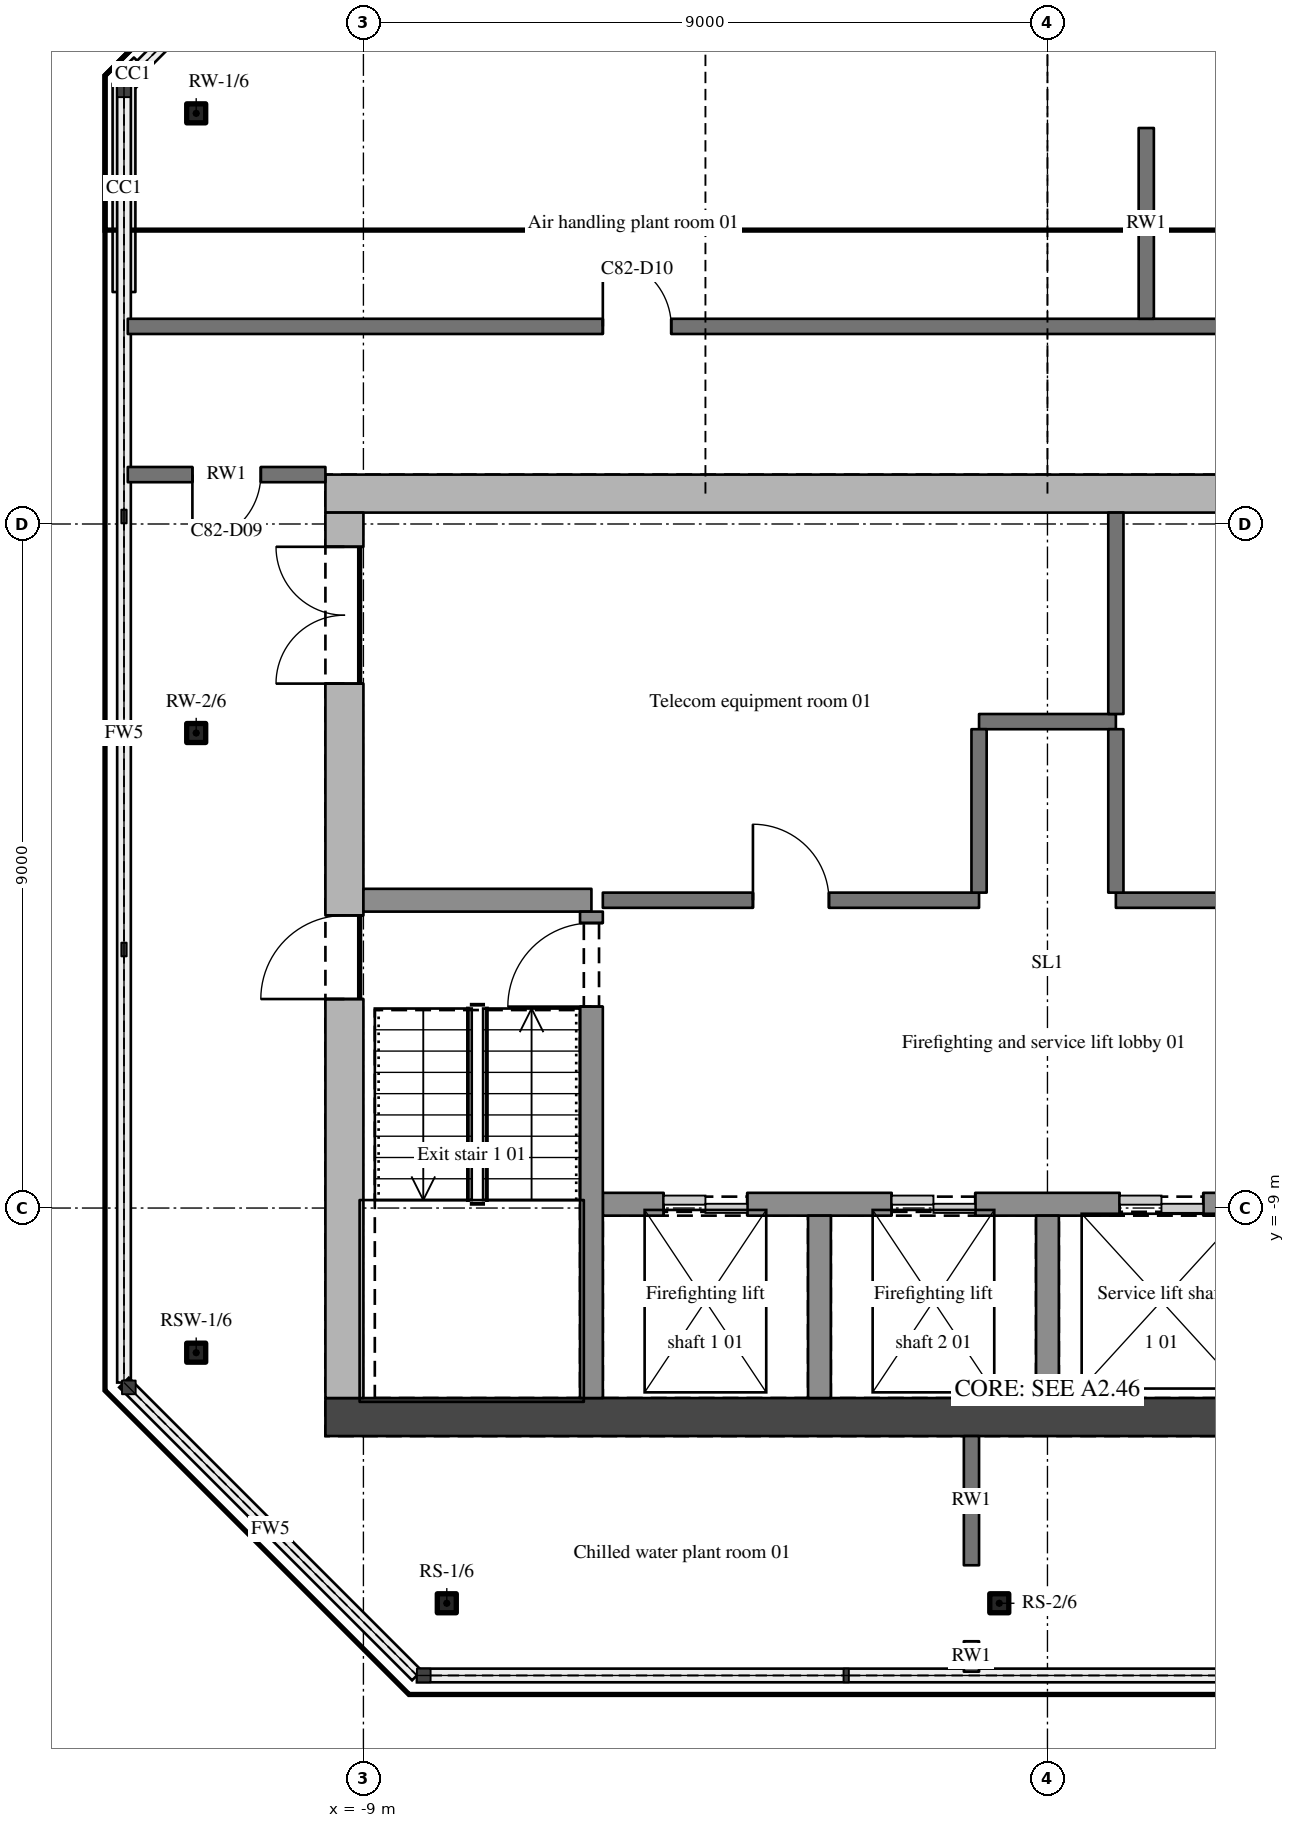
"""IFC4 building model, lengths in metres.
Left out: names, types, materials, properties, quantities, classifications, styles, units other than length and angle.
Written with IfcOpenShell. Run it as: python <this file> out.ifc"""

import sys

from ifc_helpers import new_model, si_unit, direction, frame, frame_2d, origin, origin_2d, place, context, subcontext, project, spatial, polyline, rectangle, hollow_rectangle, outline, extrude, element, fill, save


model = new_model("IFC4")
c1 = context("Model", 3, precision=1e-05, world=origin(), true_north=direction((0.0, 1.0)))
c2 = subcontext(c1, "Body", "Model", "MODEL_VIEW")
j1 = project(units=[si_unit("LENGTHUNIT", "METRE"), si_unit("PLANEANGLEUNIT", "RADIAN")], contexts=[c1])
p1 = place(None, origin())
s1 = spatial("IfcSite", under=j1, at=p1, CompositionType="ELEMENT")
p2 = place(p1, origin())
s2 = spatial("IfcBuilding", under=s1, at=p2, CompositionType="ELEMENT")
p3 = place(p2, frame((0.0, 0.0, 304.5)))
s3 = spatial("IfcBuildingStorey", under=s2, at=p3, CompositionType="ELEMENT", Elevation=304.5)
for number, where, z_axis, x_axis in (
    (1, (-7.903, -14.2, 0.0), (0.0, 0.0, 1.0), (1.0, 0.0, 0.0)),
    (2, (-0.634, -14.2, 0.0), (0.0, 0.0, 1.0), (1.0, 0.0, 0.0)),
):
    element("IfcColumn", number, at=place(p3, frame(where, z_axis=z_axis, x_axis=x_axis)), inside=s3, PredefinedType="COLUMN", context=c2, shape_type="SweptSolid", body=[
        extrude(hollow_rectangle(XDim=0.25, YDim=0.25, WallThickness=0.02, InnerFilletRadius=0.03, OuterFilletRadius=0.05, at=origin_2d()), origin(), (0.0, 0.0, 1.0), 3.6),
    ])
p4 = place(p3, frame((-11.2, 5.403, 0.0), z_axis=(0.0, 0.0, 1.0), x_axis=(1.0, 0.0, 0.0)))
e3 = element("IfcColumn", 3, at=p4, inside=s3, PredefinedType="COLUMN", context=c2, shape_type="SweptSolid", body=[
    extrude(hollow_rectangle(XDim=0.25, YDim=0.25, WallThickness=0.02, InnerFilletRadius=0.03, OuterFilletRadius=0.05, at=origin_2d()), origin(), (0.0, 0.0, 1.0), 3.392),
])
for number, where, z_axis, x_axis in (
    (4, (-11.2, -2.75, 0.0), (0.0, 0.0, 1.0), (1.0, 0.0, 0.0)),
    (5, (-11.2, -10.903, 0.0), (0.0, 0.0, 1.0), (1.0, 0.0, 0.0)),
):
    element("IfcColumn", number, at=place(p3, frame(where, z_axis=z_axis, x_axis=x_axis)), inside=s3, PredefinedType="COLUMN", context=c2, shape_type="SweptSolid", body=[
        extrude(hollow_rectangle(XDim=0.25, YDim=0.25, WallThickness=0.02, InnerFilletRadius=0.03, OuterFilletRadius=0.05, at=origin_2d()), origin(), (0.0, 0.0, 1.0), 3.6),
    ])
for number, where, z_axis, x_axis in (
    (6, (-9.5, -11.75, 0.0), (0.0, 0.0, 1.0), (1.0, 0.0, 0.0)),
    (7, (-9.5, 0.4, 0.0), (0.0, 0.0, 1.0), (1.0, 0.0, 0.0)),
):
    element("IfcWall", number, at=place(p3, frame(where, z_axis=z_axis, x_axis=x_axis)), inside=s3, PredefinedType="SHEAR", context=c2, shape_type="SweptSolid", body=[
        extrude(outline(polyline([(0.0, 0.0), (19.0, 0.0), (19.0, 3.6), (0.0, 3.6), (0.0, 0.0)])), frame((0.0, 0.25, 0.0), z_axis=(0.0, -1.0, 0.0), x_axis=(1.0, 0.0, 0.0)), (0.0, 0.0, 1.0), 0.5),
    ])
p5 = place(p3, frame((-9.25, -11.5, 0.0), z_axis=(0.0, 0.0, 1.0), x_axis=(0.0, 1.0, 0.0)))
e8 = element("IfcWall", 8, at=p5, inside=s3, PredefinedType="SHEAR", context=c2, shape_type="SweptSolid", body=[
    extrude(outline(polyline([(0.0, 0.0), (11.65, 0.0), (11.65, 3.6), (0.0, 3.6), (0.0, 0.0)])), frame((0.0, 0.25, 0.0), z_axis=(0.0, -1.0, 0.0), x_axis=(1.0, 0.0, 0.0)), (0.0, 0.0, 1.0), 0.5),
])
p6 = place(p5, frame((9.4, 0.0, 0.0)))
e9 = element("IfcOpeningElement", 9, at=p6, cuts=e8, PredefinedType="OPENING", context=c2, shape_type="SweptSolid", body=[
    extrude(rectangle(XDim=1.8, YDim=2.1, at=frame_2d((0.9, 1.05))), frame((0.0, 0.26, 0.0), z_axis=(0.0, -1.0, 0.0), x_axis=(1.0, 0.0, 0.0)), (0.0, 0.0, 1.0), 0.52),
])
p7 = place(p5, frame((5.25, 0.0, 0.0)))
e10 = element("IfcOpeningElement", 10, at=p7, cuts=e8, PredefinedType="OPENING", context=c2, shape_type="SweptSolid", body=[
    extrude(rectangle(XDim=1.1, YDim=2.1, at=frame_2d((0.55, 1.05))), frame((0.0, 0.26, 0.0), z_axis=(0.0, -1.0, 0.0), x_axis=(1.0, 0.0, 0.0)), (0.0, 0.0, 1.0), 0.52),
])
p8 = place(p3, frame((-5.85, -8.95, 0.0), z_axis=(0.0, 0.0, 1.0), x_axis=(1.0, 0.0, 0.0)))
e11 = element("IfcWall", 11, at=p8, inside=s3, PredefinedType="SHEAR", context=c2, shape_type="SweptSolid", body=[
    extrude(rectangle(XDim=11.7, YDim=0.3, at=frame_2d((5.85, 0.0))), origin(), (0.0, 0.0, 1.0), 3.6),
])
p9 = place(p8, frame((0.8, 0.0, 0.0)))
e12 = element("IfcOpeningElement", 12, at=p9, cuts=e11, PredefinedType="OPENING", context=c2, shape_type="SweptSolid", body=[
    extrude(rectangle(XDim=1.1, YDim=2.1, at=frame_2d((0.55, 1.05))), frame((0.0, 0.16, 0.0), z_axis=(0.0, -1.0, 0.0), x_axis=(1.0, 0.0, 0.0)), (0.0, 0.0, 1.0), 0.32),
])
p10 = place(p8, frame((3.8, 0.0, 0.0)))
e13 = element("IfcOpeningElement", 13, at=p10, cuts=e11, PredefinedType="OPENING", context=c2, shape_type="SweptSolid", body=[
    extrude(rectangle(XDim=1.1, YDim=2.1, at=frame_2d((0.55, 1.05))), frame((0.0, 0.16, 0.0), z_axis=(0.0, -1.0, 0.0), x_axis=(1.0, 0.0, 0.0)), (0.0, 0.0, 1.0), 0.32),
])
p11 = place(p8, frame((6.8, 0.0, 0.0)))
e14 = element("IfcOpeningElement", 14, at=p11, cuts=e11, PredefinedType="OPENING", context=c2, shape_type="SweptSolid", body=[
    extrude(rectangle(XDim=1.1, YDim=2.1, at=frame_2d((0.55, 1.05))), frame((0.0, 0.16, 0.0), z_axis=(0.0, -1.0, 0.0), x_axis=(1.0, 0.0, 0.0)), (0.0, 0.0, 1.0), 0.32),
])
p12 = place(p8, frame((9.8, 0.0, 0.0)))
e15 = element("IfcOpeningElement", 15, at=p12, cuts=e11, PredefinedType="OPENING", context=c2, shape_type="SweptSolid", body=[
    extrude(rectangle(XDim=1.1, YDim=2.1, at=frame_2d((0.55, 1.05))), frame((0.0, 0.16, 0.0), z_axis=(0.0, -1.0, 0.0), x_axis=(1.0, 0.0, 0.0)), (0.0, 0.0, 1.0), 0.32),
])
p13 = place(p3, frame((-9.0, -4.95, 0.0), z_axis=(0.0, 0.0, 1.0), x_axis=(1.0, 0.0, 0.0)))
e16 = element("IfcWall", 16, at=p13, inside=s3, PredefinedType="SHEAR", context=c2, shape_type="SweptSolid", body=[
    extrude(rectangle(XDim=3.0, YDim=0.3, at=frame_2d((1.5, 0.0))), origin(), (0.0, 0.0, 1.0), 3.6),
])
p14 = place(p3, frame((-5.85, -4.95, 0.0), z_axis=(0.0, 0.0, 1.0), x_axis=(1.0, 0.0, 0.0)))
e17 = element("IfcWall", 17, at=p14, inside=s3, PredefinedType="SOLIDWALL", context=c2, shape_type="SweptSolid", body=[
    extrude(rectangle(XDim=4.95, YDim=0.2, at=frame_2d((2.475, 0.0))), origin(), (0.0, 0.0, 1.0), 3.3),
])
p15 = place(p14, frame((1.975, 0.0, 0.0)))
e18 = element("IfcOpeningElement", 18, at=p15, cuts=e17, PredefinedType="OPENING", context=c2, shape_type="SweptSolid", body=[
    extrude(rectangle(XDim=1.0, YDim=2.1, at=frame_2d((0.5, 1.05))), frame((0.0, 0.11, 0.0), z_axis=(0.0, -1.0, 0.0), x_axis=(1.0, 0.0, 0.0)), (0.0, 0.0, 1.0), 0.22),
])
p16 = place(p3, frame((0.9, -4.95, 0.0), z_axis=(0.0, 0.0, 1.0), x_axis=(1.0, 0.0, 0.0)))
e19 = element("IfcWall", 19, at=p16, inside=s3, PredefinedType="SOLIDWALL", context=c2, shape_type="SweptSolid", body=[
    extrude(rectangle(XDim=4.95, YDim=0.2, at=frame_2d((2.475, 0.0))), origin(), (0.0, 0.0, 1.0), 3.3),
])
p17 = place(p16, frame((1.975, 0.0, 0.0)))
e20 = element("IfcOpeningElement", 20, at=p17, cuts=e19, PredefinedType="OPENING", context=c2, shape_type="SweptSolid", body=[
    extrude(rectangle(XDim=1.0, YDim=2.1, at=frame_2d((0.5, 1.05))), frame((0.0, 0.11, 0.0), z_axis=(0.0, -1.0, 0.0), x_axis=(1.0, 0.0, 0.0)), (0.0, 0.0, 1.0), 0.22),
])
p18 = place(p3, frame((-0.9, -2.6, 0.0), z_axis=(0.0, 0.0, 1.0), x_axis=(1.0, 0.0, 0.0)))
e21 = element("IfcWall", 21, at=p18, inside=s3, PredefinedType="SOLIDWALL", context=c2, shape_type="SweptSolid", body=[
    extrude(rectangle(XDim=1.8, YDim=0.2, at=frame_2d((0.9, 0.0))), origin(), (0.0, 0.0, 1.0), 3.3),
])
p19 = place(p3, frame((-9.5, 0.65, 0.0), z_axis=(0.0, 0.0, 1.0), x_axis=(-1.0, 0.0, 0.0)))
e22 = element("IfcWall", 22, at=p19, inside=s3, PredefinedType="SOLIDWALL", context=c2, shape_type="SweptSolid", body=[
    extrude(rectangle(XDim=2.6, YDim=0.2, at=frame_2d((1.3, 0.0))), origin(), (0.0, 0.0, 1.0), 2.66),
])
p20 = place(p19, frame((0.85, 0.0, 0.0)))
e23 = element("IfcOpeningElement", 23, at=p20, cuts=e22, PredefinedType="OPENING", context=c2, shape_type="SweptSolid", body=[
    extrude(rectangle(XDim=0.9, YDim=2.1, at=frame_2d((0.45, 1.05))), frame((0.0, 0.11, 0.0), z_axis=(0.0, -1.0, 0.0), x_axis=(1.0, 0.0, 0.0)), (0.0, 0.0, 1.0), 0.22),
])
p21 = place(p3, frame((-12.1, 2.6, 0.0), z_axis=(0.0, 0.0, 1.0), x_axis=(1.0, 0.0, 0.0)))
e24 = element("IfcWall", 24, at=p21, inside=s3, PredefinedType="SOLIDWALL", context=c2, shape_type="SweptSolid", body=[
    extrude(rectangle(XDim=30.2, YDim=0.2, at=frame_2d((15.1, 0.0))), origin(), (0.0, 0.0, 1.0), 2.66),
])
p22 = place(p21, frame((6.25, 0.0, 0.0)))
e25 = element("IfcOpeningElement", 25, at=p22, cuts=e24, PredefinedType="OPENING", context=c2, shape_type="SweptSolid", body=[
    extrude(rectangle(XDim=0.9, YDim=2.1, at=frame_2d((0.45, 1.05))), frame((0.0, 0.11, 0.0), z_axis=(0.0, -1.0, 0.0), x_axis=(1.0, 0.0, 0.0)), (0.0, 0.0, 1.0), 0.22),
])
p23 = place(p21, frame((16.3, 0.0, 0.0)))
e26 = element("IfcOpeningElement", 26, at=p23, cuts=e24, PredefinedType="OPENING", context=c2, shape_type="SweptSolid", body=[
    extrude(rectangle(XDim=0.9, YDim=2.1, at=frame_2d((0.45, 1.05))), frame((0.0, 0.11, 0.0), z_axis=(0.0, -1.0, 0.0), x_axis=(1.0, 0.0, 0.0)), (0.0, 0.0, 1.0), 0.22),
])
p24 = place(p21, frame((20.4, 0.0, 0.0)))
e27 = element("IfcOpeningElement", 27, at=p24, cuts=e24, PredefinedType="OPENING", context=c2, shape_type="SweptSolid", body=[
    extrude(rectangle(XDim=0.9, YDim=2.1, at=frame_2d((0.45, 1.05))), frame((0.0, 0.11, 0.0), z_axis=(0.0, -1.0, 0.0), x_axis=(1.0, 0.0, 0.0)), (0.0, 0.0, 1.0), 0.22),
])
p25 = place(p3, frame((-6.0, -11.5, 0.0), z_axis=(0.0, 0.0, 1.0), x_axis=(0.0, 1.0, 0.0)))
e28 = element("IfcWall", 28, at=p25, inside=s3, PredefinedType="SHEAR", context=c2, shape_type="SweptSolid", body=[
    extrude(rectangle(XDim=6.4, YDim=0.3, at=frame_2d((3.2, 0.0))), origin(), (0.0, 0.0, 1.0), 3.6),
])
p26 = place(p25, frame((5.15, 0.0, 0.0)))
e29 = element("IfcOpeningElement", 29, at=p26, cuts=e28, PredefinedType="OPENING", context=c2, shape_type="SweptSolid", body=[
    extrude(rectangle(XDim=1.1, YDim=2.1, at=frame_2d((0.55, 1.05))), frame((0.0, 0.16, 0.0), z_axis=(0.0, -1.0, 0.0), x_axis=(1.0, 0.0, 0.0)), (0.0, 0.0, 1.0), 0.32),
])
p27 = place(p3, frame((-3.0, -11.5, 0.0), z_axis=(0.0, 0.0, 1.0), x_axis=(0.0, 1.0, 0.0)))
e30 = element("IfcWall", 30, at=p27, inside=s3, PredefinedType="SHEAR", context=c2, shape_type="SweptSolid", body=[
    extrude(rectangle(XDim=2.4, YDim=0.3, at=frame_2d((1.2, 0.0))), origin(), (0.0, 0.0, 1.0), 3.6),
])
p28 = place(p3, frame((-1.0, -15.1, 0.0), z_axis=(0.0, 0.0, 1.0), x_axis=(0.0, 1.0, 0.0)))
e31 = element("IfcWall", 31, at=p28, inside=s3, PredefinedType="SOLIDWALL", context=c2, shape_type="SweptSolid", body=[
    extrude(rectangle(XDim=0.4, YDim=0.2, at=frame_2d((0.2, 0.0))), origin(), (0.0, 0.0, 1.0), 2.66),
])
p29 = place(p3, frame((-1.0, -13.7, 0.0), z_axis=(0.0, 0.0, 1.0), x_axis=(0.0, 1.0, 0.0)))
e32 = element("IfcWall", 32, at=p29, inside=s3, PredefinedType="SOLIDWALL", context=c2, shape_type="SweptSolid", body=[
    extrude(rectangle(XDim=1.7, YDim=0.2, at=frame_2d((0.85, 0.0))), origin(), (0.0, 0.0, 1.0), 2.66),
])
p30 = place(p3, frame((-0.9, -4.85, 0.0), z_axis=(0.0, 0.0, 1.0), x_axis=(0.0, 1.0, 0.0)))
e33 = element("IfcWall", 33, at=p30, inside=s3, PredefinedType="SOLIDWALL", context=c2, shape_type="SweptSolid", body=[
    extrude(rectangle(XDim=2.15, YDim=0.2, at=frame_2d((1.075, 0.0))), origin(), (0.0, 0.0, 1.0), 3.3),
])
p31 = place(p3, frame((0.0, -11.5, 0.0), z_axis=(0.0, 0.0, 1.0), x_axis=(0.0, 1.0, 0.0)))
e34 = element("IfcWall", 34, at=p31, inside=s3, PredefinedType="SHEAR", context=c2, shape_type="SweptSolid", body=[
    extrude(rectangle(XDim=2.4, YDim=0.3, at=frame_2d((1.2, 0.0))), origin(), (0.0, 0.0, 1.0), 3.6),
])
p32 = place(p3, frame((0.9, -4.85, 0.0), z_axis=(0.0, 0.0, 1.0), x_axis=(0.0, 1.0, 0.0)))
e35 = element("IfcWall", 35, at=p32, inside=s3, PredefinedType="SOLIDWALL", context=c2, shape_type="SweptSolid", body=[
    extrude(rectangle(XDim=2.15, YDim=0.2, at=frame_2d((1.075, 0.0))), origin(), (0.0, 0.0, 1.0), 3.3),
])
p33 = place(p3, frame((0.9, -2.5, 0.0), z_axis=(0.0, 0.0, 1.0), x_axis=(0.0, 1.0, 0.0)))
e36 = element("IfcWall", 36, at=p33, inside=s3, PredefinedType="SOLIDWALL", context=c2, shape_type="SweptSolid", body=[
    extrude(rectangle(XDim=2.65, YDim=0.2, at=frame_2d((1.325, 0.0))), origin(), (0.0, 0.0, 1.0), 2.66),
])
p34 = place(p3, frame((1.3, 2.7, 0.0), z_axis=(0.0, 0.0, 1.0), x_axis=(0.0, 1.0, 0.0)))
e37 = element("IfcWall", 37, at=p34, inside=s3, PredefinedType="SOLIDWALL", context=c2, shape_type="SweptSolid", body=[
    extrude(rectangle(XDim=2.51, YDim=0.2, at=frame_2d((1.255, 0.0))), origin(), (0.0, 0.0, 1.0), 2.66),
])
p35 = place(p15, origin())
e38 = element("IfcDoor", 38, at=p35, inside=s3, OperationType="SINGLE_SWING_LEFT", PredefinedType="DOOR", context=c2, shape_type="SweptSolid", body=[
    extrude(rectangle(XDim=1.0, YDim=2.1, at=frame_2d((0.5, 1.05))), frame((0.0, 0.025, 0.0), z_axis=(0.0, -1.0, 0.0), x_axis=(1.0, 0.0, 0.0)), (0.0, 0.0, 1.0), 0.05),
])
fill(e18, e38)
p36 = place(p6, origin())
e39 = element("IfcDoor", 39, at=p36, inside=s3, OperationType="DOUBLE_DOOR_SINGLE_SWING", PredefinedType="DOOR", context=c2, shape_type="SweptSolid", body=[
    extrude(rectangle(XDim=1.8, YDim=2.1, at=frame_2d((0.9, 1.05))), frame((0.0, 0.025, 0.0), z_axis=(0.0, -1.0, 0.0), x_axis=(1.0, 0.0, 0.0)), (0.0, 0.0, 1.0), 0.05),
])
fill(e9, e39)
p37 = place(p26, origin())
e40 = element("IfcDoor", 40, at=p37, inside=s3, OperationType="SINGLE_SWING_LEFT", PredefinedType="DOOR", context=c2, shape_type="SweptSolid", body=[
    extrude(rectangle(XDim=1.1, YDim=2.1, at=frame_2d((0.55, 1.05))), frame((0.0, 0.025, 0.0), z_axis=(0.0, -1.0, 0.0), x_axis=(1.0, 0.0, 0.0)), (0.0, 0.0, 1.0), 0.05),
])
fill(e29, e40)
p38 = place(p7, origin())
e41 = element("IfcDoor", 41, at=p38, inside=s3, OperationType="SINGLE_SWING_LEFT", PredefinedType="DOOR", context=c2, shape_type="SweptSolid", body=[
    extrude(rectangle(XDim=1.1, YDim=2.1, at=frame_2d((0.55, 1.05))), frame((0.0, 0.025, 0.0), z_axis=(0.0, -1.0, 0.0), x_axis=(1.0, 0.0, 0.0)), (0.0, 0.0, 1.0), 0.05),
])
fill(e10, e41)
p39 = place(p22, origin())
e42 = element("IfcDoor", 42, at=p39, inside=s3, OperationType="SINGLE_SWING_LEFT", PredefinedType="DOOR", context=c2, shape_type="SweptSolid", body=[
    extrude(rectangle(XDim=0.9, YDim=2.1, at=frame_2d((0.45, 1.05))), frame((0.0, 0.025, 0.0), z_axis=(0.0, -1.0, 0.0), x_axis=(1.0, 0.0, 0.0)), (0.0, 0.0, 1.0), 0.05),
])
fill(e25, e42)
p40 = place(p20, origin())
e43 = element("IfcDoor", 43, at=p40, inside=s3, OperationType="SINGLE_SWING_RIGHT", PredefinedType="DOOR", context=c2, shape_type="SweptSolid", body=[
    extrude(rectangle(XDim=0.9, YDim=2.1, at=frame_2d((0.45, 1.05))), frame((0.0, 0.025, 0.0), z_axis=(0.0, -1.0, 0.0), x_axis=(1.0, 0.0, 0.0)), (0.0, 0.0, 1.0), 0.05),
])
fill(e23, e43)
p41 = place(p9, origin())
e44 = element("IfcDoor", 44, at=p41, inside=s3, OperationType="DOUBLE_DOOR_SLIDING", PredefinedType="DOOR", context=c2, shape_type="SweptSolid", body=[
    extrude(rectangle(XDim=1.1, YDim=2.1, at=frame_2d((0.55, 1.05))), frame((0.0, 0.025, 0.0), z_axis=(0.0, -1.0, 0.0), x_axis=(1.0, 0.0, 0.0)), (0.0, 0.0, 1.0), 0.05),
])
fill(e12, e44)
p42 = place(p10, origin())
e45 = element("IfcDoor", 45, at=p42, inside=s3, OperationType="DOUBLE_DOOR_SLIDING", PredefinedType="DOOR", context=c2, shape_type="SweptSolid", body=[
    extrude(rectangle(XDim=1.1, YDim=2.1, at=frame_2d((0.55, 1.05))), frame((0.0, 0.025, 0.0), z_axis=(0.0, -1.0, 0.0), x_axis=(1.0, 0.0, 0.0)), (0.0, 0.0, 1.0), 0.05),
])
fill(e13, e45)
p43 = place(p11, origin())
e46 = element("IfcDoor", 46, at=p43, inside=s3, OperationType="DOUBLE_DOOR_SLIDING", PredefinedType="DOOR", context=c2, shape_type="SweptSolid", body=[
    extrude(rectangle(XDim=1.1, YDim=2.1, at=frame_2d((0.55, 1.05))), frame((0.0, 0.025, 0.0), z_axis=(0.0, -1.0, 0.0), x_axis=(1.0, 0.0, 0.0)), (0.0, 0.0, 1.0), 0.05),
])
fill(e14, e46)
save(model, sys.argv[1])
